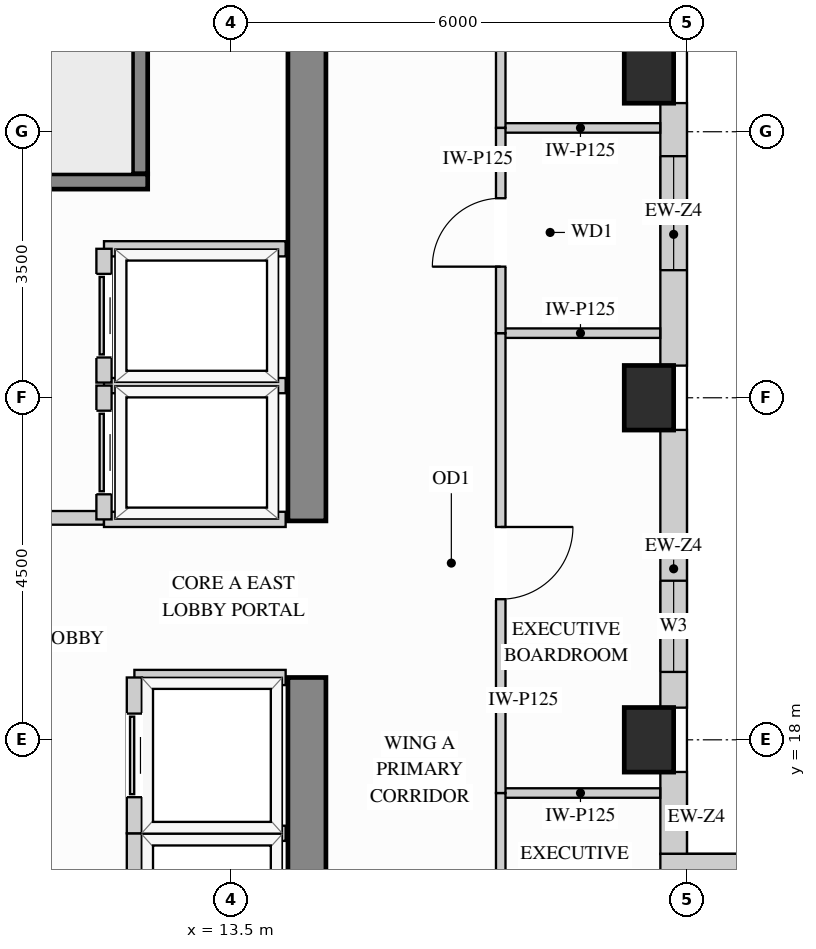
"""IFC4 building model, lengths in metres.
Left out: names, types, materials, properties, quantities, classifications, styles, units other than length and angle.
Written with IfcOpenShell. Run it as: python <this file> out.ifc"""

import sys

from ifc_helpers import new_model, si_unit, direction, frame, frame_2d, origin, origin_2d, place, context, subcontext, project, spatial, rectangle, extrude, source, transform, mapped, element, fill, save


model = new_model("IFC4")
c1 = context("Model", 3, precision=1e-05, world=origin(), true_north=direction((0.0, 1.0)))
c2 = subcontext(c1, "Body", "Model", "MODEL_VIEW")
j1 = project(units=[si_unit("LENGTHUNIT", "METRE"), si_unit("PLANEANGLEUNIT", "RADIAN")], contexts=[c1])
p1 = place(None, origin())
s1 = spatial("IfcSite", under=j1, at=p1, CompositionType="ELEMENT")
p2 = place(p1, origin())
s2 = spatial("IfcBuilding", under=s1, at=p2, CompositionType="ELEMENT")
p3 = place(p2, frame((0.0, 0.0, 223.2)))
s3 = spatial("IfcBuildingStorey", under=s2, at=p3, CompositionType="ELEMENT", Elevation=223.2)
m1 = source(origin(), c2, "Body", "SweptSolid", [
    extrude(rectangle(XDim=0.65, YDim=0.85, at=origin_2d()), origin(), (0.0, 0.0, 1.0), 3.4),
])
for number, where, z_axis, x_axis in (
    (1, (19.0, 18.0, 0.0), (0.0, 0.0, 1.0), (1.0, 0.0, 0.0)),
    (2, (19.0, 22.5, 0.0), (0.0, 0.0, 1.0), (1.0, 0.0, 0.0)),
    (3, (19.0, 26.8, 0.0), (0.0, 0.0, 1.0), (1.0, 0.0, 0.0)),
):
    element("IfcColumn", number, at=place(p3, frame(where, z_axis=z_axis, x_axis=x_axis)), inside=s3, PredefinedType="COLUMN", context=c2, shape_type="MappedRepresentation", body=[
        mapped(m1, transform((0.0, 0.0, 0.0), x_axis=(1.0, 0.0, 0.0), y_axis=(0.0, 1.0, 0.0), z_axis=(0.0, 0.0, 1.0))),
    ])
m2 = source(origin(), c2, "Body", "SweptSolid", [
    extrude(rectangle(XDim=10.07, YDim=0.5, at=frame_2d((5.035, 0.0))), origin(), (0.0, 0.0, 1.0), 3.4),
])
p4 = place(p3, frame((14.5, 8.75, 0.0), z_axis=(0.0, 0.0, 1.0), x_axis=(0.0, 1.0, 0.0)))
e4 = element("IfcWall", 4, at=p4, inside=s3, PredefinedType="SHEAR", context=c2, shape_type="MappedRepresentation", body=[
    mapped(m2, transform((0.0, 0.0, 0.0), x_axis=(1.0, 0.0, 0.0), y_axis=(0.0, 1.0, 0.0), z_axis=(0.0, 0.0, 1.0))),
])
m3 = source(origin(), c2, "Body", "SweptSolid", [
    extrude(rectangle(XDim=8.37, YDim=0.5, at=frame_2d((4.185, 0.0))), origin(), (0.0, 0.0, 1.0), 3.4),
])
p5 = place(p3, frame((14.5, 20.88, 0.0), z_axis=(0.0, 0.0, 1.0), x_axis=(0.0, 1.0, 0.0)))
e5 = element("IfcWall", 5, at=p5, inside=s3, PredefinedType="SHEAR", context=c2, shape_type="MappedRepresentation", body=[
    mapped(m3, transform((0.0, 0.0, 0.0), x_axis=(1.0, 0.0, 0.0), y_axis=(0.0, 1.0, 0.0), z_axis=(0.0, 0.0, 1.0))),
])
m4 = source(origin(), c2, "Body", "SweptSolid", [
    extrude(rectangle(XDim=1.079, YDim=0.35, at=frame_2d((0.54, 0.0))), origin(), (0.0, 0.0, 1.0), 2.619),
])
p6 = place(p3, frame((19.325, 16.498, 0.0), z_axis=(0.0, 0.0, 1.0), x_axis=(0.0, 1.0, 0.0)))
e6 = element("IfcWall", 6, at=p6, inside=s3, PredefinedType="SOLIDWALL", context=c2, shape_type="MappedRepresentation", body=[
    mapped(m4, transform((0.0, 0.0, 0.0), x_axis=(1.0, 0.0, 0.0), y_axis=(0.0, 1.0, 0.0), z_axis=(0.0, 0.0, 1.0))),
])
p7 = place(p3, frame((19.325, 18.423, 0.0), z_axis=(0.0, 0.0, 1.0), x_axis=(0.0, 1.0, 0.0)))
e7 = element("IfcWall", 7, at=p7, inside=s3, PredefinedType="SOLIDWALL", context=c2, shape_type="SweptSolid", body=[
    extrude(rectangle(XDim=3.654, YDim=0.35, at=frame_2d((1.827, 0.0))), origin(), (0.0, 0.0, 1.0), 2.619),
])
p8 = place(p7, frame((0.47, 0.0, 0.78)))
e8 = element("IfcOpeningElement", 8, at=p8, cuts=e7, PredefinedType="OPENING", context=c2, shape_type="SweptSolid", body=[
    extrude(rectangle(XDim=1.2, YDim=1.659, at=frame_2d((0.6, 0.83))), frame((0.0, 0.185, 0.0), z_axis=(0.0, -1.0, 0.0), x_axis=(1.0, 0.0, 0.0)), (0.0, 0.0, 1.0), 0.37),
])
p9 = place(p3, frame((19.325, 22.923, 0.0), z_axis=(0.0, 0.0, 1.0), x_axis=(0.0, 1.0, 0.0)))
e9 = element("IfcWall", 9, at=p9, inside=s3, PredefinedType="SOLIDWALL", context=c2, shape_type="SweptSolid", body=[
    extrude(rectangle(XDim=3.454, YDim=0.35, at=frame_2d((1.727, 0.0))), origin(), (0.0, 0.0, 1.0), 2.619),
])
p10 = place(p9, frame((1.256, 0.0, 0.78)))
e10 = element("IfcOpeningElement", 10, at=p10, cuts=e9, PredefinedType="OPENING", context=c2, shape_type="SweptSolid", body=[
    extrude(rectangle(XDim=1.5, YDim=1.659, at=frame_2d((0.75, 0.83))), frame((0.0, 0.185, 0.0), z_axis=(0.0, -1.0, 0.0), x_axis=(1.0, 0.0, 0.0)), (0.0, 0.0, 1.0), 0.37),
])
p11 = place(p3, frame((23.077, 16.325, 0.0), z_axis=(0.0, 0.0, 1.0), x_axis=(-1.0, 0.0, 0.0)))
e11 = element("IfcWall", 11, at=p11, inside=s3, PredefinedType="SOLIDWALL", context=c2, shape_type="SweptSolid", body=[
    extrude(rectangle(XDim=3.927, YDim=0.35, at=frame_2d((1.963, 0.0))), origin(), (0.0, 0.0, 1.0), 3.385),
])
p12 = place(p11, frame((1.213, 0.0, 0.78)))
e12 = element("IfcOpeningElement", 12, at=p12, cuts=e11, PredefinedType="OPENING", context=c2, shape_type="SweptSolid", body=[
    extrude(rectangle(XDim=1.5, YDim=2.0, at=frame_2d((0.75, 1.0))), frame((0.0, 0.185, 0.0), z_axis=(0.0, -1.0, 0.0), x_axis=(1.0, 0.0, 0.0)), (0.0, 0.0, 1.0), 0.37),
])
p13 = place(p3, frame((7.15, 20.92, 0.0), z_axis=(0.0, 0.0, 1.0), x_axis=(1.0, 0.0, 0.0)))
e13 = element("IfcWall", 13, at=p13, inside=s3, PredefinedType="PARTITIONING", context=c2, shape_type="SweptSolid", body=[
    extrude(rectangle(XDim=4.68, YDim=0.18, at=frame_2d((2.34, 0.0))), origin(), (0.0, 0.0, 1.0), 3.385),
])
p14 = place(p13, frame((2.2, 0.0, 0.0)))
e14 = element("IfcOpeningElement", 14, at=p14, cuts=e13, PredefinedType="OPENING", context=c2, shape_type="SweptSolid", body=[
    extrude(rectangle(XDim=1.1, YDim=2.15, at=frame_2d((0.55, 1.075))), frame((0.0, 0.1, 0.0), z_axis=(0.0, -1.0, 0.0), x_axis=(1.0, 0.0, 0.0)), (0.0, 0.0, 1.0), 0.2),
])
m5 = source(origin(), c2, "Body", "SweptSolid", [
    extrude(rectangle(XDim=2.098, YDim=0.125, at=frame_2d((1.049, 0.0))), origin(), (0.0, 0.0, 1.0), 3.385),
])
for number, where, z_axis, x_axis in (
    (15, (17.05, 17.3, 0.0), (0.0, 0.0, 1.0), (1.0, 0.0, 0.0)),
    (16, (17.05, 23.35, 0.0), (0.0, 0.0, 1.0), (1.0, 0.0, 0.0)),
    (17, (17.05, 26.05, 0.0), (0.0, 0.0, 1.0), (1.0, 0.0, 0.0)),
):
    element("IfcWall", number, at=place(p3, frame(where, z_axis=z_axis, x_axis=x_axis)), inside=s3, PredefinedType="PARTITIONING", context=c2, shape_type="MappedRepresentation", body=[
        mapped(m5, transform((0.0, 0.0, 0.0), x_axis=(1.0, 0.0, 0.0), y_axis=(0.0, 1.0, 0.0), z_axis=(0.0, 0.0, 1.0))),
    ])
p15 = place(p3, frame((17.05, 12.35, 0.0), z_axis=(0.0, 0.0, 1.0), x_axis=(0.0, 1.0, 0.0)))
e18 = element("IfcWall", 18, at=p15, inside=s3, PredefinedType="PARTITIONING", context=c2, shape_type="SweptSolid", body=[
    extrude(rectangle(XDim=4.95, YDim=0.125, at=frame_2d((2.475, 0.0))), origin(), (0.0, 0.0, 1.0), 3.385),
])
p16 = place(p15, frame((2.0, 0.0, 0.0)))
e19 = element("IfcOpeningElement", 19, at=p16, cuts=e18, PredefinedType="OPENING", context=c2, shape_type="SweptSolid", body=[
    extrude(rectangle(XDim=0.95, YDim=2.15, at=frame_2d((0.475, 1.075))), frame((0.0, 0.073, 0.0), z_axis=(0.0, -1.0, 0.0), x_axis=(1.0, 0.0, 0.0)), (0.0, 0.0, 1.0), 0.145),
])
p17 = place(p3, frame((17.05, 17.3, 0.0), z_axis=(0.0, 0.0, 1.0), x_axis=(0.0, 1.0, 0.0)))
e20 = element("IfcWall", 20, at=p17, inside=s3, PredefinedType="PARTITIONING", context=c2, shape_type="SweptSolid", body=[
    extrude(rectangle(XDim=6.05, YDim=0.125, at=frame_2d((3.025, 0.0))), origin(), (0.0, 0.0, 1.0), 3.385),
])
p18 = place(p17, frame((2.55, 0.0, 0.0)))
e21 = element("IfcOpeningElement", 21, at=p18, cuts=e20, PredefinedType="OPENING", context=c2, shape_type="SweptSolid", body=[
    extrude(rectangle(XDim=0.95, YDim=2.15, at=frame_2d((0.475, 1.075))), frame((0.0, 0.073, 0.0), z_axis=(0.0, -1.0, 0.0), x_axis=(1.0, 0.0, 0.0)), (0.0, 0.0, 1.0), 0.145),
])
p19 = place(p3, frame((17.05, 26.05, 0.0), z_axis=(0.0, 0.0, 1.0), x_axis=(0.0, 1.0, 0.0)))
e22 = element("IfcWall", 22, at=p19, inside=s3, PredefinedType="PARTITIONING", context=c2, shape_type="SweptSolid", body=[
    extrude(rectangle(XDim=5.5, YDim=0.125, at=frame_2d((2.75, 0.0))), origin(), (0.0, 0.0, 1.0), 3.385),
])
p20 = place(p19, frame((2.275, 0.0, 0.0)))
e23 = element("IfcOpeningElement", 23, at=p20, cuts=e22, PredefinedType="OPENING", context=c2, shape_type="SweptSolid", body=[
    extrude(rectangle(XDim=0.95, YDim=2.15, at=frame_2d((0.475, 1.075))), frame((0.0, 0.073, 0.0), z_axis=(0.0, -1.0, 0.0), x_axis=(1.0, 0.0, 0.0)), (0.0, 0.0, 1.0), 0.145),
])
p21 = place(p3, frame((17.05, 23.35, 0.0), z_axis=(0.0, 0.0, 1.0), x_axis=(0.0, 1.0, 0.0)))
e24 = element("IfcWall", 24, at=p21, inside=s3, PredefinedType="PARTITIONING", context=c2, shape_type="SweptSolid", body=[
    extrude(rectangle(XDim=2.7, YDim=0.125, at=frame_2d((1.35, 0.0))), origin(), (0.0, 0.0, 1.0), 3.385),
])
p22 = place(p21, frame((0.875, 0.0, 0.0)))
e25 = element("IfcOpeningElement", 25, at=p22, cuts=e24, PredefinedType="OPENING", context=c2, shape_type="SweptSolid", body=[
    extrude(rectangle(XDim=0.9, YDim=2.15, at=frame_2d((0.45, 1.075))), frame((0.0, 0.073, 0.0), z_axis=(0.0, -1.0, 0.0), x_axis=(1.0, 0.0, 0.0)), (0.0, 0.0, 1.0), 0.145),
])
m6 = source(origin(), c2, "Body", "SweptSolid", [
    extrude(rectangle(XDim=2.39, YDim=0.2, at=frame_2d((1.195, 0.0))), origin(), (0.0, 0.0, 1.0), 3.385),
])
for number, where, z_axis, x_axis in (
    (26, (11.83, 22.66, 0.0), (0.0, 0.0, 1.0), (1.0, 0.0, 0.0)),
    (27, (11.83, 20.9, 0.0), (0.0, 0.0, 1.0), (1.0, 0.0, 0.0)),
):
    element("IfcWall", number, at=place(p3, frame(where, z_axis=z_axis, x_axis=x_axis)), inside=s3, PredefinedType="PARTITIONING", context=c2, shape_type="MappedRepresentation", body=[
        mapped(m6, transform((0.0, 0.0, 0.0), x_axis=(1.0, 0.0, 0.0), y_axis=(0.0, 1.0, 0.0), z_axis=(0.0, 0.0, 1.0))),
    ])
p23 = place(p3, frame((11.83, 20.9, 0.0), z_axis=(0.0, 0.0, 1.0), x_axis=(0.0, 1.0, 0.0)))
e28 = element("IfcWall", 28, at=p23, inside=s3, PredefinedType="PARTITIONING", context=c2, shape_type="SweptSolid", body=[
    extrude(rectangle(XDim=1.76, YDim=0.2, at=frame_2d((0.88, 0.0))), origin(), (0.0, 0.0, 1.0), 3.385),
])
p24 = place(p23, frame((0.33, 0.0, 0.0)))
e29 = element("IfcOpeningElement", 29, at=p24, cuts=e28, PredefinedType="OPENING", context=c2, shape_type="SweptSolid", body=[
    extrude(rectangle(XDim=1.1, YDim=2.2, at=frame_2d((0.55, 1.1))), frame((0.0, 0.11, 0.0), z_axis=(0.0, -1.0, 0.0), x_axis=(1.0, 0.0, 0.0)), (0.0, 0.0, 1.0), 0.22),
])
p25 = place(p3, frame((11.83, 24.46, 0.0), z_axis=(0.0, 0.0, 1.0), x_axis=(1.0, 0.0, 0.0)))
e30 = element("IfcWall", 30, at=p25, inside=s3, PredefinedType="PARTITIONING", context=c2, shape_type="MappedRepresentation", body=[
    mapped(m6, transform((0.0, 0.0, 0.0), x_axis=(1.0, 0.0, 0.0), y_axis=(0.0, 1.0, 0.0), z_axis=(0.0, 0.0, 1.0))),
])
p26 = place(p3, frame((11.83, 22.7, 0.0), z_axis=(0.0, 0.0, 1.0), x_axis=(0.0, 1.0, 0.0)))
e31 = element("IfcWall", 31, at=p26, inside=s3, PredefinedType="PARTITIONING", context=c2, shape_type="SweptSolid", body=[
    extrude(rectangle(XDim=1.76, YDim=0.2, at=frame_2d((0.88, 0.0))), origin(), (0.0, 0.0, 1.0), 3.385),
])
p27 = place(p26, frame((0.33, 0.0, 0.0)))
e32 = element("IfcOpeningElement", 32, at=p27, cuts=e31, PredefinedType="OPENING", context=c2, shape_type="SweptSolid", body=[
    extrude(rectangle(XDim=1.1, YDim=2.2, at=frame_2d((0.55, 1.1))), frame((0.0, 0.11, 0.0), z_axis=(0.0, -1.0, 0.0), x_axis=(1.0, 0.0, 0.0)), (0.0, 0.0, 1.0), 0.22),
])
m7 = source(origin(), c2, "Body", "SweptSolid", [
    extrude(rectangle(XDim=1.99, YDim=0.2, at=frame_2d((0.995, 0.0))), origin(), (0.0, 0.0, 1.0), 3.385),
])
p28 = place(p3, frame((12.23, 16.77, 0.0), z_axis=(0.0, 0.0, 1.0), x_axis=(1.0, 0.0, 0.0)))
e33 = element("IfcWall", 33, at=p28, inside=s3, PredefinedType="PARTITIONING", context=c2, shape_type="MappedRepresentation", body=[
    mapped(m7, transform((0.0, 0.0, 0.0), x_axis=(1.0, 0.0, 0.0), y_axis=(0.0, 1.0, 0.0), z_axis=(0.0, 0.0, 1.0))),
])
p29 = place(p3, frame((12.23, 14.7, 0.0), z_axis=(0.0, 0.0, 1.0), x_axis=(0.0, 1.0, 0.0)))
e34 = element("IfcWall", 34, at=p29, inside=s3, PredefinedType="PARTITIONING", context=c2, shape_type="SweptSolid", body=[
    extrude(rectangle(XDim=2.07, YDim=0.2, at=frame_2d((1.035, 0.0))), origin(), (0.0, 0.0, 1.0), 3.385),
])
p30 = place(p29, frame((0.485, 0.0, 0.0)))
e35 = element("IfcOpeningElement", 35, at=p30, cuts=e34, PredefinedType="OPENING", context=c2, shape_type="SweptSolid", body=[
    extrude(rectangle(XDim=1.1, YDim=2.2, at=frame_2d((0.55, 1.1))), frame((0.0, 0.11, 0.0), z_axis=(0.0, -1.0, 0.0), x_axis=(1.0, 0.0, 0.0)), (0.0, 0.0, 1.0), 0.22),
])
p31 = place(p3, frame((12.23, 18.82, 0.0), z_axis=(0.0, 0.0, 1.0), x_axis=(1.0, 0.0, 0.0)))
e36 = element("IfcWall", 36, at=p31, inside=s3, PredefinedType="PARTITIONING", context=c2, shape_type="MappedRepresentation", body=[
    mapped(m7, transform((0.0, 0.0, 0.0), x_axis=(1.0, 0.0, 0.0), y_axis=(0.0, 1.0, 0.0), z_axis=(0.0, 0.0, 1.0))),
])
p32 = place(p3, frame((12.23, 16.77, 0.0), z_axis=(0.0, 0.0, 1.0), x_axis=(0.0, 1.0, 0.0)))
e37 = element("IfcWall", 37, at=p32, inside=s3, PredefinedType="PARTITIONING", context=c2, shape_type="SweptSolid", body=[
    extrude(rectangle(XDim=2.05, YDim=0.2, at=frame_2d((1.025, 0.0))), origin(), (0.0, 0.0, 1.0), 3.385),
])
p33 = place(p32, frame((0.475, 0.0, 0.0)))
e38 = element("IfcOpeningElement", 38, at=p33, cuts=e37, PredefinedType="OPENING", context=c2, shape_type="SweptSolid", body=[
    extrude(rectangle(XDim=1.1, YDim=2.2, at=frame_2d((0.55, 1.1))), frame((0.0, 0.11, 0.0), z_axis=(0.0, -1.0, 0.0), x_axis=(1.0, 0.0, 0.0)), (0.0, 0.0, 1.0), 0.22),
])
m8 = source(origin(), c2, "Body", "SweptSolid", [
    extrude(rectangle(XDim=3.803, YDim=0.2, at=frame_2d((1.901, 0.0))), origin(), (0.0, 0.0, 1.0), 3.4),
])
p34 = place(p3, frame((12.305, 25.445, 0.0), z_axis=(0.0, 0.0, 1.0), x_axis=(0.0, 1.0, 0.0)))
e39 = element("IfcWall", 39, at=p34, inside=s3, PredefinedType="SHEAR", context=c2, shape_type="MappedRepresentation", body=[
    mapped(m8, transform((0.0, 0.0, 0.0), x_axis=(1.0, 0.0, 0.0), y_axis=(0.0, 1.0, 0.0), z_axis=(0.0, 0.0, 1.0))),
])
p35 = place(p3, frame((4.752, 25.345, 0.0), z_axis=(0.0, 0.0, 1.0), x_axis=(1.0, 0.0, 0.0)))
e40 = element("IfcWall", 40, at=p35, inside=s3, PredefinedType="SHEAR", context=c2, shape_type="SweptSolid", body=[
    extrude(rectangle(XDim=7.653, YDim=0.2, at=frame_2d((3.827, 0.0))), origin(), (0.0, 0.0, 1.0), 3.4),
])
p36 = place(p35, frame((0.4, 0.0, 0.0)))
e41 = element("IfcOpeningElement", 41, at=p36, cuts=e40, PredefinedType="OPENING", context=c2, shape_type="SweptSolid", body=[
    extrude(rectangle(XDim=1.1, YDim=2.15, at=frame_2d((0.55, 1.075))), frame((0.0, 0.11, 0.0), z_axis=(0.0, -1.0, 0.0), x_axis=(1.0, 0.0, 0.0)), (0.0, 0.0, 1.0), 0.22),
])
m9 = source(origin(), c2, "Body", "SweptSolid", [
    extrude(rectangle(XDim=1.1, YDim=2.2, at=frame_2d((0.55, 1.1))), frame((0.0, 0.025, 0.0), z_axis=(0.0, -1.0, 0.0), x_axis=(1.0, 0.0, 0.0)), (0.0, 0.0, 1.0), 0.05),
])
p37 = place(p24, origin())
e42 = element("IfcDoor", 42, at=p37, inside=s3, OperationType="SLIDING_TO_LEFT", PredefinedType="DOOR", context=c2, shape_type="MappedRepresentation", body=[
    mapped(m9, transform((0.0, 0.0, 0.0), x_axis=(1.0, 0.0, 0.0), y_axis=(0.0, 1.0, 0.0), z_axis=(0.0, 0.0, 1.0))),
])
fill(e29, e42)
p38 = place(p27, origin())
e43 = element("IfcDoor", 43, at=p38, inside=s3, OperationType="SLIDING_TO_LEFT", PredefinedType="DOOR", context=c2, shape_type="MappedRepresentation", body=[
    mapped(m9, transform((0.0, 0.0, 0.0), x_axis=(1.0, 0.0, 0.0), y_axis=(0.0, 1.0, 0.0), z_axis=(0.0, 0.0, 1.0))),
])
fill(e32, e43)
p39 = place(p33, origin())
e44 = element("IfcDoor", 44, at=p39, inside=s3, OperationType="SLIDING_TO_LEFT", PredefinedType="DOOR", context=c2, shape_type="MappedRepresentation", body=[
    mapped(m9, transform((0.0, 0.0, 0.0), x_axis=(1.0, 0.0, 0.0), y_axis=(0.0, 1.0, 0.0), z_axis=(0.0, 0.0, 1.0))),
])
fill(e38, e44)
m10 = source(origin(), c2, "Body", "SweptSolid", [
    extrude(rectangle(XDim=0.95, YDim=2.15, at=frame_2d((0.475, 1.075))), frame((0.0, 0.025, 0.0), z_axis=(0.0, -1.0, 0.0), x_axis=(1.0, 0.0, 0.0)), (0.0, 0.0, 1.0), 0.05),
])
p40 = place(p18, origin())
e45 = element("IfcDoor", 45, at=p40, inside=s3, OperationType="SINGLE_SWING_RIGHT", PredefinedType="DOOR", context=c2, shape_type="MappedRepresentation", body=[
    mapped(m10, transform((0.0, 0.0, 0.0), x_axis=(1.0, 0.0, 0.0), y_axis=(0.0, 1.0, 0.0), z_axis=(0.0, 0.0, 1.0))),
])
fill(e21, e45)
m11 = source(origin(), c2, "Body", "SweptSolid", [
    extrude(rectangle(XDim=0.9, YDim=2.15, at=frame_2d((0.45, 1.075))), frame((0.0, 0.025, 0.0), z_axis=(0.0, -1.0, 0.0), x_axis=(1.0, 0.0, 0.0)), (0.0, 0.0, 1.0), 0.05),
])
p41 = place(p22, origin())
e46 = element("IfcDoor", 46, at=p41, inside=s3, OperationType="SINGLE_SWING_LEFT", PredefinedType="DOOR", context=c2, shape_type="MappedRepresentation", body=[
    mapped(m11, transform((0.0, 0.0, 0.0), x_axis=(1.0, 0.0, 0.0), y_axis=(0.0, 1.0, 0.0), z_axis=(0.0, 0.0, 1.0))),
])
fill(e25, e46)
m12 = source(origin(), c2, "Body", "SweptSolid", [
    extrude(rectangle(XDim=1.2, YDim=1.659, at=frame_2d((0.6, 0.83))), frame((0.0, 0.03, 0.0), z_axis=(0.0, -1.0, 0.0), x_axis=(1.0, 0.0, 0.0)), (0.0, 0.0, 1.0), 0.06),
])
p42 = place(p8, origin())
e47 = element("IfcWindow", 47, at=p42, inside=s3, PartitioningType="SINGLE_PANEL", PredefinedType="WINDOW", context=c2, shape_type="MappedRepresentation", body=[
    mapped(m12, transform((0.0, 0.0, 0.0), x_axis=(1.0, 0.0, 0.0), y_axis=(0.0, 1.0, 0.0), z_axis=(0.0, 0.0, 1.0))),
])
fill(e8, e47)
m13 = source(origin(), c2, "Body", "SweptSolid", [
    extrude(rectangle(XDim=1.5, YDim=1.659, at=frame_2d((0.75, 0.83))), frame((0.0, 0.03, 0.0), z_axis=(0.0, -1.0, 0.0), x_axis=(1.0, 0.0, 0.0)), (0.0, 0.0, 1.0), 0.06),
])
p43 = place(p10, origin())
e48 = element("IfcWindow", 48, at=p43, inside=s3, PartitioningType="SINGLE_PANEL", PredefinedType="WINDOW", context=c2, shape_type="MappedRepresentation", body=[
    mapped(m13, transform((0.0, 0.0, 0.0), x_axis=(1.0, 0.0, 0.0), y_axis=(0.0, 1.0, 0.0), z_axis=(0.0, 0.0, 1.0))),
])
fill(e10, e48)
save(model, sys.argv[1])
